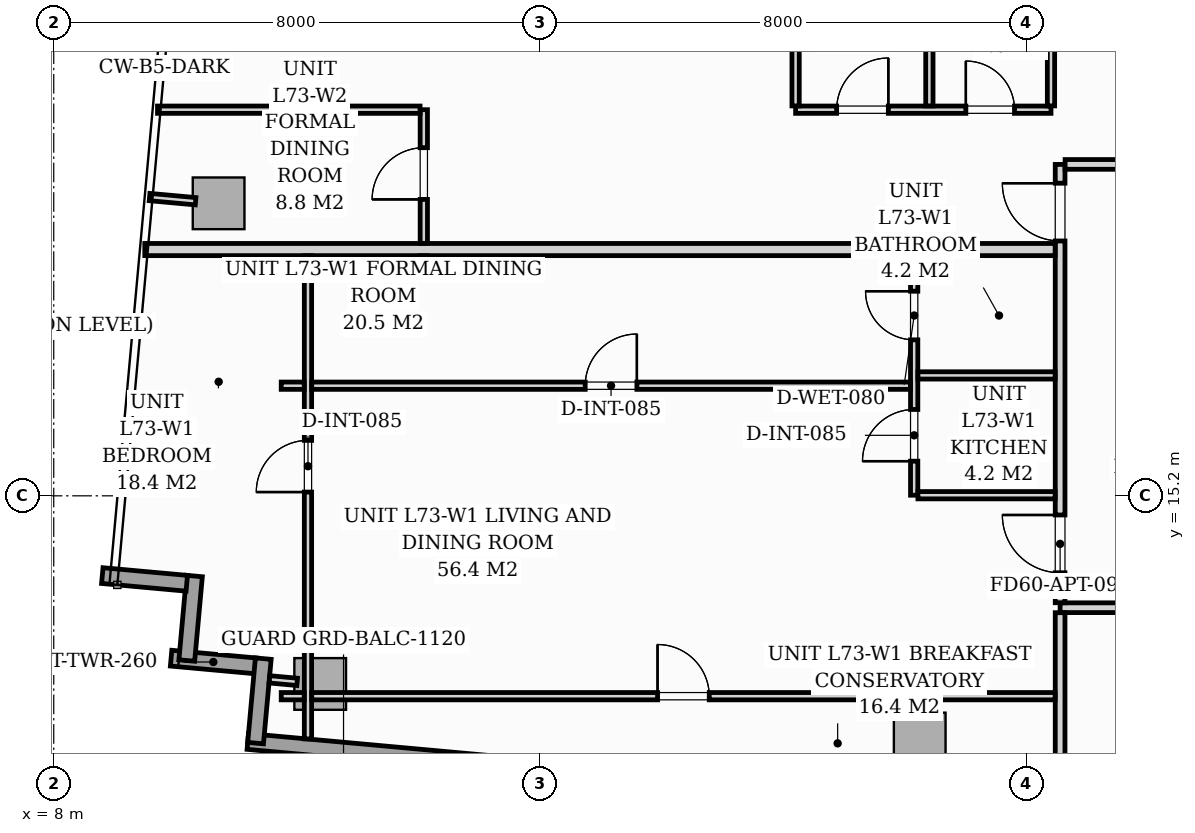
"""IFC4 building model, lengths in metres.
Left out: names, types, materials, properties, quantities, classifications, styles, units other than length and angle.
Written with IfcOpenShell. Run it as: python <this file> out.ifc"""

import sys

from ifc_helpers import new_model, si_unit, direction, frame, frame_2d, origin, origin_2d, place, context, subcontext, project, spatial, rectangle, extrude, source, transform, mapped, element, fill, save


model = new_model("IFC4")
c1 = context("Model", 3, precision=1e-05, world=origin(), true_north=direction((0.0, 1.0)))
c2 = subcontext(c1, "Body", "Model", "MODEL_VIEW")
j1 = project(units=[si_unit("LENGTHUNIT", "METRE"), si_unit("PLANEANGLEUNIT", "RADIAN")], contexts=[c1])
p1 = place(None, origin())
s1 = spatial("IfcSite", under=j1, at=p1, CompositionType="ELEMENT")
p2 = place(p1, origin())
s2 = spatial("IfcBuilding", under=s1, at=p2, CompositionType="ELEMENT")
p3 = place(p2, frame((0.0, 0.0, 252.9)))
s3 = spatial("IfcBuildingStorey", under=s2, at=p3, CompositionType="ELEMENT", Elevation=252.9)
m1 = source(origin(), c2, "Body", "SweptSolid", [
    extrude(rectangle(XDim=0.85, YDim=0.85, at=origin_2d()), origin(), (0.0, 0.0, 1.0), 3.296),
])
for number, where, z_axis, x_axis in (
    (1, (12.382, 12.106, 0.002), (0.0, 0.0, 1.0), (0.996, -0.091, 0.0)),
    (2, (22.241, 11.209, 0.002), (0.0, 0.0, 1.0), (0.996, -0.091, 0.0)),
    (3, (10.711, 20.01, 0.002), (0.0, 0.0, 1.0), (0.996, -0.091, 0.0)),
):
    element("IfcColumn", number, at=place(p3, frame(where, z_axis=z_axis, x_axis=x_axis)), inside=s3, PredefinedType="COLUMN", context=c2, shape_type="MappedRepresentation", body=[
        mapped(m1, transform((0.0, 0.0, 0.0), scale=1.0)),
    ])
p4 = place(p3, frame((11.319, 12.404, 0.0), z_axis=(0.0, 0.0, 1.0), x_axis=(-0.995881721538, 0.090661991521, 0.0)))
e4 = element("IfcWall", 4, at=p4, inside=s3, PredefinedType="STANDARD", context=c2, shape_type="SweptSolid", body=[
    extrude(rectangle(XDim=1.395, YDim=0.26, at=frame_2d((0.698, 0.0))), origin(), (0.0, 0.0, 1.0), 3.04),
])
p5 = place(p3, frame((10.188, 12.492, 0.0), z_axis=(0.0, 0.0, 1.0), x_axis=(0.090646191665, 0.995883159782, 0.0)))
e5 = element("IfcWall", 5, at=p5, inside=s3, PredefinedType="STANDARD", context=c2, shape_type="SweptSolid", body=[
    extrude(rectangle(XDim=1.395, YDim=0.26, at=frame_2d((0.698, 0.0))), origin(), (0.0, 0.0, 1.0), 3.04),
])
p6 = place(p3, frame((10.188, 13.762, 0.0), z_axis=(0.0, 0.0, 1.0), x_axis=(-0.995881721538, 0.090661991521, 0.0)))
e6 = element("IfcWall", 6, at=p6, inside=s3, PredefinedType="STANDARD", context=c2, shape_type="SweptSolid", body=[
    extrude(rectangle(XDim=1.395, YDim=0.26, at=frame_2d((0.698, 0.0))), origin(), (0.0, 0.0, 1.0), 3.04),
])
p7 = place(p3, frame((25.761, 9.834, 0.0), z_axis=(0.0, 0.0, 1.0), x_axis=(-0.995884584572, 0.090630536861, 0.0)))
e7 = element("IfcWall", 7, at=p7, inside=s3, PredefinedType="STANDARD", context=c2, shape_type="SweptSolid", body=[
    extrude(rectangle(XDim=14.63, YDim=0.26, at=frame_2d((7.315, 0.0))), origin(), (0.0, 0.0, 1.0), 3.04),
])
p8 = place(p7, frame((5.81, 0.0, 0.0)))
e8 = element("IfcOpeningElement", 8, at=p8, cuts=e7, PredefinedType="OPENING", context=c2, shape_type="SweptSolid", body=[
    extrude(rectangle(XDim=1.8, YDim=2.06, at=frame_2d((0.9, 1.03))), frame((0.0, 0.14, 0.0), z_axis=(0.0, -1.0, 0.0), x_axis=(1.0, 0.0, 0.0)), (0.0, 0.0, 1.0), 0.28),
])
p9 = place(p7, frame((8.35, 0.0, 0.65)))
e9 = element("IfcOpeningElement", 9, at=p9, cuts=e7, PredefinedType="OPENING", context=c2, shape_type="SweptSolid", body=[
    extrude(rectangle(XDim=1.6, YDim=1.5, at=frame_2d((0.8, 0.75))), frame((0.0, 0.14, 0.0), z_axis=(0.0, -1.0, 0.0), x_axis=(1.0, 0.0, 0.0)), (0.0, 0.0, 1.0), 0.28),
])
p10 = place(p3, frame((11.319, 11.134, 0.0), z_axis=(0.0, 0.0, 1.0), x_axis=(0.090661991521, 0.995881721538, 0.0)))
e10 = element("IfcWall", 10, at=p10, inside=s3, PredefinedType="STANDARD", context=c2, shape_type="SweptSolid", body=[
    extrude(rectangle(XDim=1.395, YDim=0.26, at=frame_2d((0.698, 0.0))), origin(), (0.0, 0.0, 1.0), 3.04),
])
p11 = place(p3, frame((24.55, 13.36, 0.0), z_axis=(0.0, 0.0, 1.0), x_axis=(1.0, 0.0, 0.0)))
e11 = element("IfcWall", 11, at=p11, inside=s3, PredefinedType="PARTITIONING", context=c2, shape_type="SweptSolid", body=[
    extrude(rectangle(XDim=21.33, YDim=0.16, at=frame_2d((10.665, 0.0))), origin(), (0.0, 0.0, 1.0), 2.605),
])
p12 = place(p11, frame((5.415, 0.0, 0.0)))
e12 = element("IfcOpeningElement", 12, at=p12, cuts=e11, PredefinedType="OPENING", context=c2, shape_type="SweptSolid", body=[
    extrude(rectangle(XDim=0.95, YDim=2.06, at=frame_2d((0.475, 1.03))), frame((0.0, 0.09, 0.0), z_axis=(0.0, -1.0, 0.0), x_axis=(1.0, 0.0, 0.0)), (0.0, 0.0, 1.0), 0.18),
])
p13 = place(p3, frame((24.55, 10.077, 0.0), z_axis=(0.0, 0.0, 1.0), x_axis=(0.0, 1.0, 0.0)))
e13 = element("IfcWall", 13, at=p13, inside=s3, PredefinedType="PARTITIONING", context=c2, shape_type="SweptSolid", body=[
    extrude(rectangle(XDim=3.201, YDim=0.16, at=frame_2d((1.601, 0.0))), origin(), (0.0, 0.0, 1.0), 3.04),
])
p14 = place(p3, frame((24.55, 13.442, 0.0), z_axis=(0.0, 0.0, 1.0), x_axis=(0.0, 1.0, 0.0)))
e14 = element("IfcWall", 14, at=p14, inside=s3, PredefinedType="PARTITIONING", context=c2, shape_type="SweptSolid", body=[
    extrude(rectangle(XDim=7.208, YDim=0.16, at=frame_2d((3.604, 0.0))), origin(), (0.0, 0.0, 1.0), 3.04),
])
p15 = place(p14, frame((0.493, 0.0, 0.0)))
e15 = element("IfcOpeningElement", 15, at=p15, cuts=e14, PredefinedType="OPENING", context=c2, shape_type="SweptSolid", body=[
    extrude(rectangle(XDim=0.95, YDim=2.06, at=frame_2d((0.475, 1.03))), frame((0.0, 0.09, 0.0), z_axis=(0.0, -1.0, 0.0), x_axis=(1.0, 0.0, 0.0)), (0.0, 0.0, 1.0), 0.18),
])
p16 = place(p14, frame((5.949, 0.0, 0.0)))
e16 = element("IfcOpeningElement", 16, at=p16, cuts=e14, PredefinedType="OPENING", context=c2, shape_type="SweptSolid", body=[
    extrude(rectangle(XDim=0.95, YDim=2.06, at=frame_2d((0.475, 1.03))), frame((0.0, 0.09, 0.0), z_axis=(0.0, -1.0, 0.0), x_axis=(1.0, 0.0, 0.0)), (0.0, 0.0, 1.0), 0.18),
])
p17 = place(p3, frame((24.632, 20.65, 0.0), z_axis=(0.0, 0.0, 1.0), x_axis=(1.0, 0.0, 0.0)))
e17 = element("IfcWall", 17, at=p17, inside=s3, PredefinedType="PARTITIONING", context=c2, shape_type="SweptSolid", body=[
    extrude(rectangle(XDim=1.566, YDim=0.16, at=frame_2d((0.783, 0.0))), origin(), (0.0, 0.0, 1.0), 3.04),
])
p18 = place(p3, frame((9.497, 19.25, 0.0), z_axis=(0.0, 0.0, 1.0), x_axis=(1.0, 0.0, 0.0)))
e18 = element("IfcWall", 18, at=p18, inside=s3, PredefinedType="PARTITIONING", context=c2, shape_type="SweptSolid", body=[
    extrude(rectangle(XDim=14.971, YDim=0.2, at=frame_2d((7.485, 0.0))), origin(), (0.0, 0.0, 1.0), 2.382),
])
p19 = place(p3, frame((22.15, 15.21, 0.0), z_axis=(0.0, 0.0, 1.0), x_axis=(0.0, 1.0, 0.0)))
e19 = element("IfcWall", 19, at=p19, inside=s3, PredefinedType="PARTITIONING", context=c2, shape_type="SweptSolid", body=[
    extrude(rectangle(XDim=3.938, YDim=0.12, at=frame_2d((1.969, 0.0))), origin(), (0.0, 0.0, 1.0), 3.04),
])
p20 = place(p19, frame((0.56, 0.0, 0.0)))
e20 = element("IfcOpeningElement", 20, at=p20, cuts=e19, PredefinedType="OPENING", context=c2, shape_type="SweptSolid", body=[
    extrude(rectangle(XDim=0.85, YDim=2.05, at=frame_2d((0.425, 1.025))), frame((0.0, 0.07, 0.0), z_axis=(0.0, -1.0, 0.0), x_axis=(1.0, 0.0, 0.0)), (0.0, 0.0, 1.0), 0.14),
])
p21 = place(p19, frame((2.555, 0.0, 0.0)))
e21 = element("IfcOpeningElement", 21, at=p21, cuts=e19, PredefinedType="OPENING", context=c2, shape_type="SweptSolid", body=[
    extrude(rectangle(XDim=0.8, YDim=2.02, at=frame_2d((0.4, 1.01))), frame((0.0, 0.07, 0.0), z_axis=(0.0, -1.0, 0.0), x_axis=(1.0, 0.0, 0.0)), (0.0, 0.0, 1.0), 0.14),
])
for number, where, z_axis, x_axis in (
    (22, (22.212, 17.18, 0.0), (0.0, 0.0, 1.0), (1.0, 0.0, 0.0)),
    (23, (22.212, 15.21, 0.0), (0.0, 0.0, 1.0), (1.0, 0.0, 0.0)),
):
    element("IfcWall", number, at=place(p3, frame(where, z_axis=z_axis, x_axis=x_axis)), inside=s3, PredefinedType="PARTITIONING", context=c2, shape_type="SweptSolid", body=[
        extrude(rectangle(XDim=2.256, YDim=0.12, at=frame_2d((1.128, 0.0))), origin(), (0.0, 0.0, 1.0), 3.04),
    ])
p22 = place(p3, frame((12.181, 11.203, 0.0), z_axis=(0.0, 0.0, 1.0), x_axis=(0.0, 1.0, 0.0)))
e24 = element("IfcWall", 24, at=p22, inside=s3, PredefinedType="PARTITIONING", context=c2, shape_type="SweptSolid", body=[
    extrude(rectangle(XDim=7.945, YDim=0.12, at=frame_2d((3.973, 0.0))), origin(), (0.0, 0.0, 1.0), 2.483),
])
p23 = place(p22, frame((4.059, 0.0, 0.0)))
e25 = element("IfcOpeningElement", 25, at=p23, cuts=e24, PredefinedType="OPENING", context=c2, shape_type="SweptSolid", body=[
    extrude(rectangle(XDim=0.85, YDim=2.05, at=frame_2d((0.425, 1.025))), frame((0.0, 0.07, 0.0), z_axis=(0.0, -1.0, 0.0), x_axis=(1.0, 0.0, 0.0)), (0.0, 0.0, 1.0), 0.14),
])
p24 = place(p3, frame((11.741, 17.011, 0.0), z_axis=(0.0, 0.0, 1.0), x_axis=(1.0, 0.0, 0.0)))
e26 = element("IfcWall", 26, at=p24, inside=s3, PredefinedType="PARTITIONING", context=c2, shape_type="SweptSolid", body=[
    extrude(rectangle(XDim=0.378, YDim=0.12, at=frame_2d((0.189, 0.0))), origin(), (0.0, 0.0, 1.0), 3.04),
])
p25 = place(p3, frame((12.243, 17.011, 0.0), z_axis=(0.0, 0.0, 1.0), x_axis=(1.0, 0.0, 0.0)))
e27 = element("IfcWall", 27, at=p25, inside=s3, PredefinedType="PARTITIONING", context=c2, shape_type="SweptSolid", body=[
    extrude(rectangle(XDim=9.845, YDim=0.12, at=frame_2d((4.922, 0.0))), origin(), (0.0, 0.0, 1.0), 3.04),
])
p26 = place(p25, frame((4.497, 0.0, 0.0)))
e28 = element("IfcOpeningElement", 28, at=p26, cuts=e27, PredefinedType="OPENING", context=c2, shape_type="SweptSolid", body=[
    extrude(rectangle(XDim=0.85, YDim=2.05, at=frame_2d((0.425, 1.025))), frame((0.0, 0.07, 0.0), z_axis=(0.0, -1.0, 0.0), x_axis=(1.0, 0.0, 0.0)), (0.0, 0.0, 1.0), 0.14),
])
p27 = place(p3, frame((11.741, 11.905, 0.0), z_axis=(0.0, 0.0, 1.0), x_axis=(1.0, 0.0, 0.0)))
e29 = element("IfcWall", 29, at=p27, inside=s3, PredefinedType="PARTITIONING", context=c2, shape_type="SweptSolid", body=[
    extrude(rectangle(XDim=0.378, YDim=0.12, at=frame_2d((0.189, 0.0))), origin(), (0.0, 0.0, 1.0), 3.04),
])
p28 = place(p3, frame((12.243, 11.905, 0.0), z_axis=(0.0, 0.0, 1.0), x_axis=(1.0, 0.0, 0.0)))
e30 = element("IfcWall", 30, at=p28, inside=s3, PredefinedType="PARTITIONING", context=c2, shape_type="SweptSolid", body=[
    extrude(rectangle(XDim=12.225, YDim=0.12, at=frame_2d((6.113, 0.0))), origin(), (0.0, 0.0, 1.0), 2.483),
])
p29 = place(p28, frame((5.687, 0.0, 0.0)))
e31 = element("IfcOpeningElement", 31, at=p29, cuts=e30, PredefinedType="OPENING", context=c2, shape_type="SweptSolid", body=[
    extrude(rectangle(XDim=0.85, YDim=2.05, at=frame_2d((0.425, 1.025))), frame((0.0, 0.07, 0.0), z_axis=(0.0, -1.0, 0.0), x_axis=(1.0, 0.0, 0.0)), (0.0, 0.0, 1.0), 0.14),
])
p30 = place(p3, frame((20.2, 21.55, 0.0), z_axis=(0.0, 0.0, 1.0), x_axis=(1.0, 0.0, 0.0)))
e32 = element("IfcWall", 32, at=p30, inside=s3, PredefinedType="PARTITIONING", context=c2, shape_type="SweptSolid", body=[
    extrude(rectangle(XDim=4.2, YDim=0.12, at=frame_2d((2.1, 0.0))), origin(), (0.0, 0.0, 1.0), 3.04),
])
p31 = place(p30, frame((0.675, 0.0, 0.0)))
e33 = element("IfcOpeningElement", 33, at=p31, cuts=e32, PredefinedType="OPENING", context=c2, shape_type="SweptSolid", body=[
    extrude(rectangle(XDim=0.85, YDim=2.05, at=frame_2d((0.425, 1.025))), frame((0.0, 0.07, 0.0), z_axis=(0.0, -1.0, 0.0), x_axis=(1.0, 0.0, 0.0)), (0.0, 0.0, 1.0), 0.14),
])
p32 = place(p30, frame((2.8, 0.0, 0.0)))
e34 = element("IfcOpeningElement", 34, at=p32, cuts=e32, PredefinedType="OPENING", context=c2, shape_type="SweptSolid", body=[
    extrude(rectangle(XDim=0.8, YDim=2.02, at=frame_2d((0.4, 1.01))), frame((0.0, 0.07, 0.0), z_axis=(0.0, -1.0, 0.0), x_axis=(1.0, 0.0, 0.0)), (0.0, 0.0, 1.0), 0.14),
])
for number, where, z_axis, x_axis in (
    (35, (20.2, 21.612, 0.0), (0.0, 0.0, 1.0), (0.0, 1.0, 0.0)),
    (36, (22.4, 21.612, 0.0), (0.0, 0.0, 1.0), (0.0, 1.0, 0.0)),
    (37, (24.4, 21.612, 0.0), (0.0, 0.0, 1.0), (0.0, 1.0, 0.0)),
):
    element("IfcWall", number, at=place(p3, frame(where, z_axis=z_axis, x_axis=x_axis)), inside=s3, PredefinedType="PARTITIONING", context=c2, shape_type="SweptSolid", body=[
        extrude(rectangle(XDim=2.126, YDim=0.12, at=frame_2d((1.063, 0.0))), origin(), (0.0, 0.0, 1.0), 3.04),
    ])
p33 = place(p3, frame((14.086, 18.75, 0.0), z_axis=(0.0, 0.0, 1.0), x_axis=(0.0, 1.0, 0.0)))
e38 = element("IfcWall", 38, at=p33, inside=s3, PredefinedType="PARTITIONING", context=c2, shape_type="SweptSolid", body=[
    extrude(rectangle(XDim=0.398, YDim=0.12, at=frame_2d((0.199, 0.0))), origin(), (0.0, 0.0, 1.0), 3.04),
])
p34 = place(p3, frame((14.086, 19.352, 0.0), z_axis=(0.0, 0.0, 1.0), x_axis=(0.0, 1.0, 0.0)))
e39 = element("IfcWall", 39, at=p34, inside=s3, PredefinedType="PARTITIONING", context=c2, shape_type="SweptSolid", body=[
    extrude(rectangle(XDim=2.198, YDim=0.12, at=frame_2d((1.099, 0.0))), origin(), (0.0, 0.0, 1.0), 3.04),
])
p35 = place(p34, frame((0.723, 0.0, 0.0)))
e40 = element("IfcOpeningElement", 40, at=p35, cuts=e39, PredefinedType="OPENING", context=c2, shape_type="SweptSolid", body=[
    extrude(rectangle(XDim=0.85, YDim=2.05, at=frame_2d((0.425, 1.025))), frame((0.0, 0.07, 0.0), z_axis=(0.0, -1.0, 0.0), x_axis=(1.0, 0.0, 0.0)), (0.0, 0.0, 1.0), 0.14),
])
p36 = place(p3, frame((9.707, 21.55, 0.0), z_axis=(0.0, 0.0, 1.0), x_axis=(1.0, 0.0, 0.0)))
e41 = element("IfcWall", 41, at=p36, inside=s3, PredefinedType="PARTITIONING", context=c2, shape_type="SweptSolid", body=[
    extrude(rectangle(XDim=4.317, YDim=0.12, at=frame_2d((2.159, 0.0))), origin(), (0.0, 0.0, 1.0), 3.04),
])
p37 = place(p3, frame((12.003, 12.141, 0.0), z_axis=(0.0, 0.0, 1.0), x_axis=(-0.995884462012, 0.090631883588, 0.0)))
e42 = element("IfcWall", 42, at=p37, inside=s3, PredefinedType="PARTITIONING", context=c2, shape_type="SweptSolid", body=[
    extrude(rectangle(XDim=0.458, YDim=0.12, at=frame_2d((0.229, 0.0))), origin(), (0.0, 0.0, 1.0), 3.04),
])
p38 = place(p3, frame((10.333, 20.045, 0.0), z_axis=(0.0, 0.0, 1.0), x_axis=(-0.995890573658, 0.09056470228, 0.0)))
e43 = element("IfcWall", 43, at=p38, inside=s3, PredefinedType="PARTITIONING", context=c2, shape_type="SweptSolid", body=[
    extrude(rectangle(XDim=0.76, YDim=0.12, at=frame_2d((0.38, 0.0))), origin(), (0.0, 0.0, 1.0), 3.04),
])
m2 = source(origin(), c2, "Body", "SweptSolid", [
    extrude(rectangle(XDim=0.95, YDim=2.06, at=frame_2d((0.475, 1.03))), frame((0.0, 0.025, 0.0), z_axis=(0.0, -1.0, 0.0), x_axis=(1.0, 0.0, 0.0)), (0.0, 0.0, 1.0), 0.05),
])
p39 = place(p15, origin())
e44 = element("IfcDoor", 44, at=p39, inside=s3, OperationType="SINGLE_SWING_RIGHT", PredefinedType="DOOR", context=c2, shape_type="MappedRepresentation", body=[
    mapped(m2, transform((0.0, 0.0, 0.0), scale=1.0)),
])
fill(e15, e44)
m3 = source(origin(), c2, "Body", "SweptSolid", [
    extrude(rectangle(XDim=0.85, YDim=2.05, at=frame_2d((0.425, 1.025))), frame((0.0, 0.025, 0.0), z_axis=(0.0, -1.0, 0.0), x_axis=(1.0, 0.0, 0.0)), (0.0, 0.0, 1.0), 0.05),
])
p40 = place(p20, origin())
e45 = element("IfcDoor", 45, at=p40, inside=s3, OperationType="SINGLE_SWING_LEFT", PredefinedType="DOOR", context=c2, shape_type="MappedRepresentation", body=[
    mapped(m3, transform((0.0, 0.0, 0.0), scale=1.0)),
])
fill(e20, e45)
m4 = source(origin(), c2, "Body", "SweptSolid", [
    extrude(rectangle(XDim=0.8, YDim=2.02, at=frame_2d((0.4, 1.01))), frame((0.0, 0.025, 0.0), z_axis=(0.0, -1.0, 0.0), x_axis=(1.0, 0.0, 0.0)), (0.0, 0.0, 1.0), 0.05),
])
p41 = place(p21, origin())
e46 = element("IfcDoor", 46, at=p41, inside=s3, OperationType="SINGLE_SWING_RIGHT", PredefinedType="DOOR", context=c2, shape_type="MappedRepresentation", body=[
    mapped(m4, transform((0.0, 0.0, 0.0), scale=1.0)),
])
fill(e21, e46)
p42 = place(p23, origin())
e47 = element("IfcDoor", 47, at=p42, inside=s3, OperationType="SINGLE_SWING_LEFT", PredefinedType="DOOR", context=c2, shape_type="MappedRepresentation", body=[
    mapped(m3, transform((0.0, 0.0, 0.0), scale=1.0)),
])
fill(e25, e47)
p43 = place(p26, origin())
e48 = element("IfcDoor", 48, at=p43, inside=s3, OperationType="SINGLE_SWING_RIGHT", PredefinedType="DOOR", context=c2, shape_type="MappedRepresentation", body=[
    mapped(m3, transform((0.0, 0.0, 0.0), scale=1.0)),
])
fill(e28, e48)
p44 = place(p29, origin())
e49 = element("IfcDoor", 49, at=p44, inside=s3, OperationType="SINGLE_SWING_LEFT", PredefinedType="DOOR", context=c2, shape_type="MappedRepresentation", body=[
    mapped(m3, transform((0.0, 0.0, 0.0), scale=1.0)),
])
fill(e31, e49)
p45 = place(p16, origin())
e50 = element("IfcDoor", 50, at=p45, inside=s3, OperationType="SINGLE_SWING_RIGHT", PredefinedType="DOOR", context=c2, shape_type="MappedRepresentation", body=[
    mapped(m2, transform((0.0, 0.0, 0.0), scale=1.0)),
])
fill(e16, e50)
p46 = place(p35, origin())
e51 = element("IfcDoor", 51, at=p46, inside=s3, OperationType="SINGLE_SWING_LEFT", PredefinedType="DOOR", context=c2, shape_type="MappedRepresentation", body=[
    mapped(m3, transform((0.0, 0.0, 0.0), scale=1.0)),
])
fill(e40, e51)
p47 = place(p31, origin())
e52 = element("IfcDoor", 52, at=p47, inside=s3, OperationType="SINGLE_SWING_RIGHT", PredefinedType="DOOR", context=c2, shape_type="MappedRepresentation", body=[
    mapped(m3, transform((0.0, 0.0, 0.0), scale=1.0)),
])
fill(e33, e52)
p48 = place(p32, origin())
e53 = element("IfcDoor", 53, at=p48, inside=s3, OperationType="SINGLE_SWING_LEFT", PredefinedType="DOOR", context=c2, shape_type="MappedRepresentation", body=[
    mapped(m4, transform((0.0, 0.0, 0.0), scale=1.0)),
])
fill(e34, e53)
save(model, sys.argv[1])
